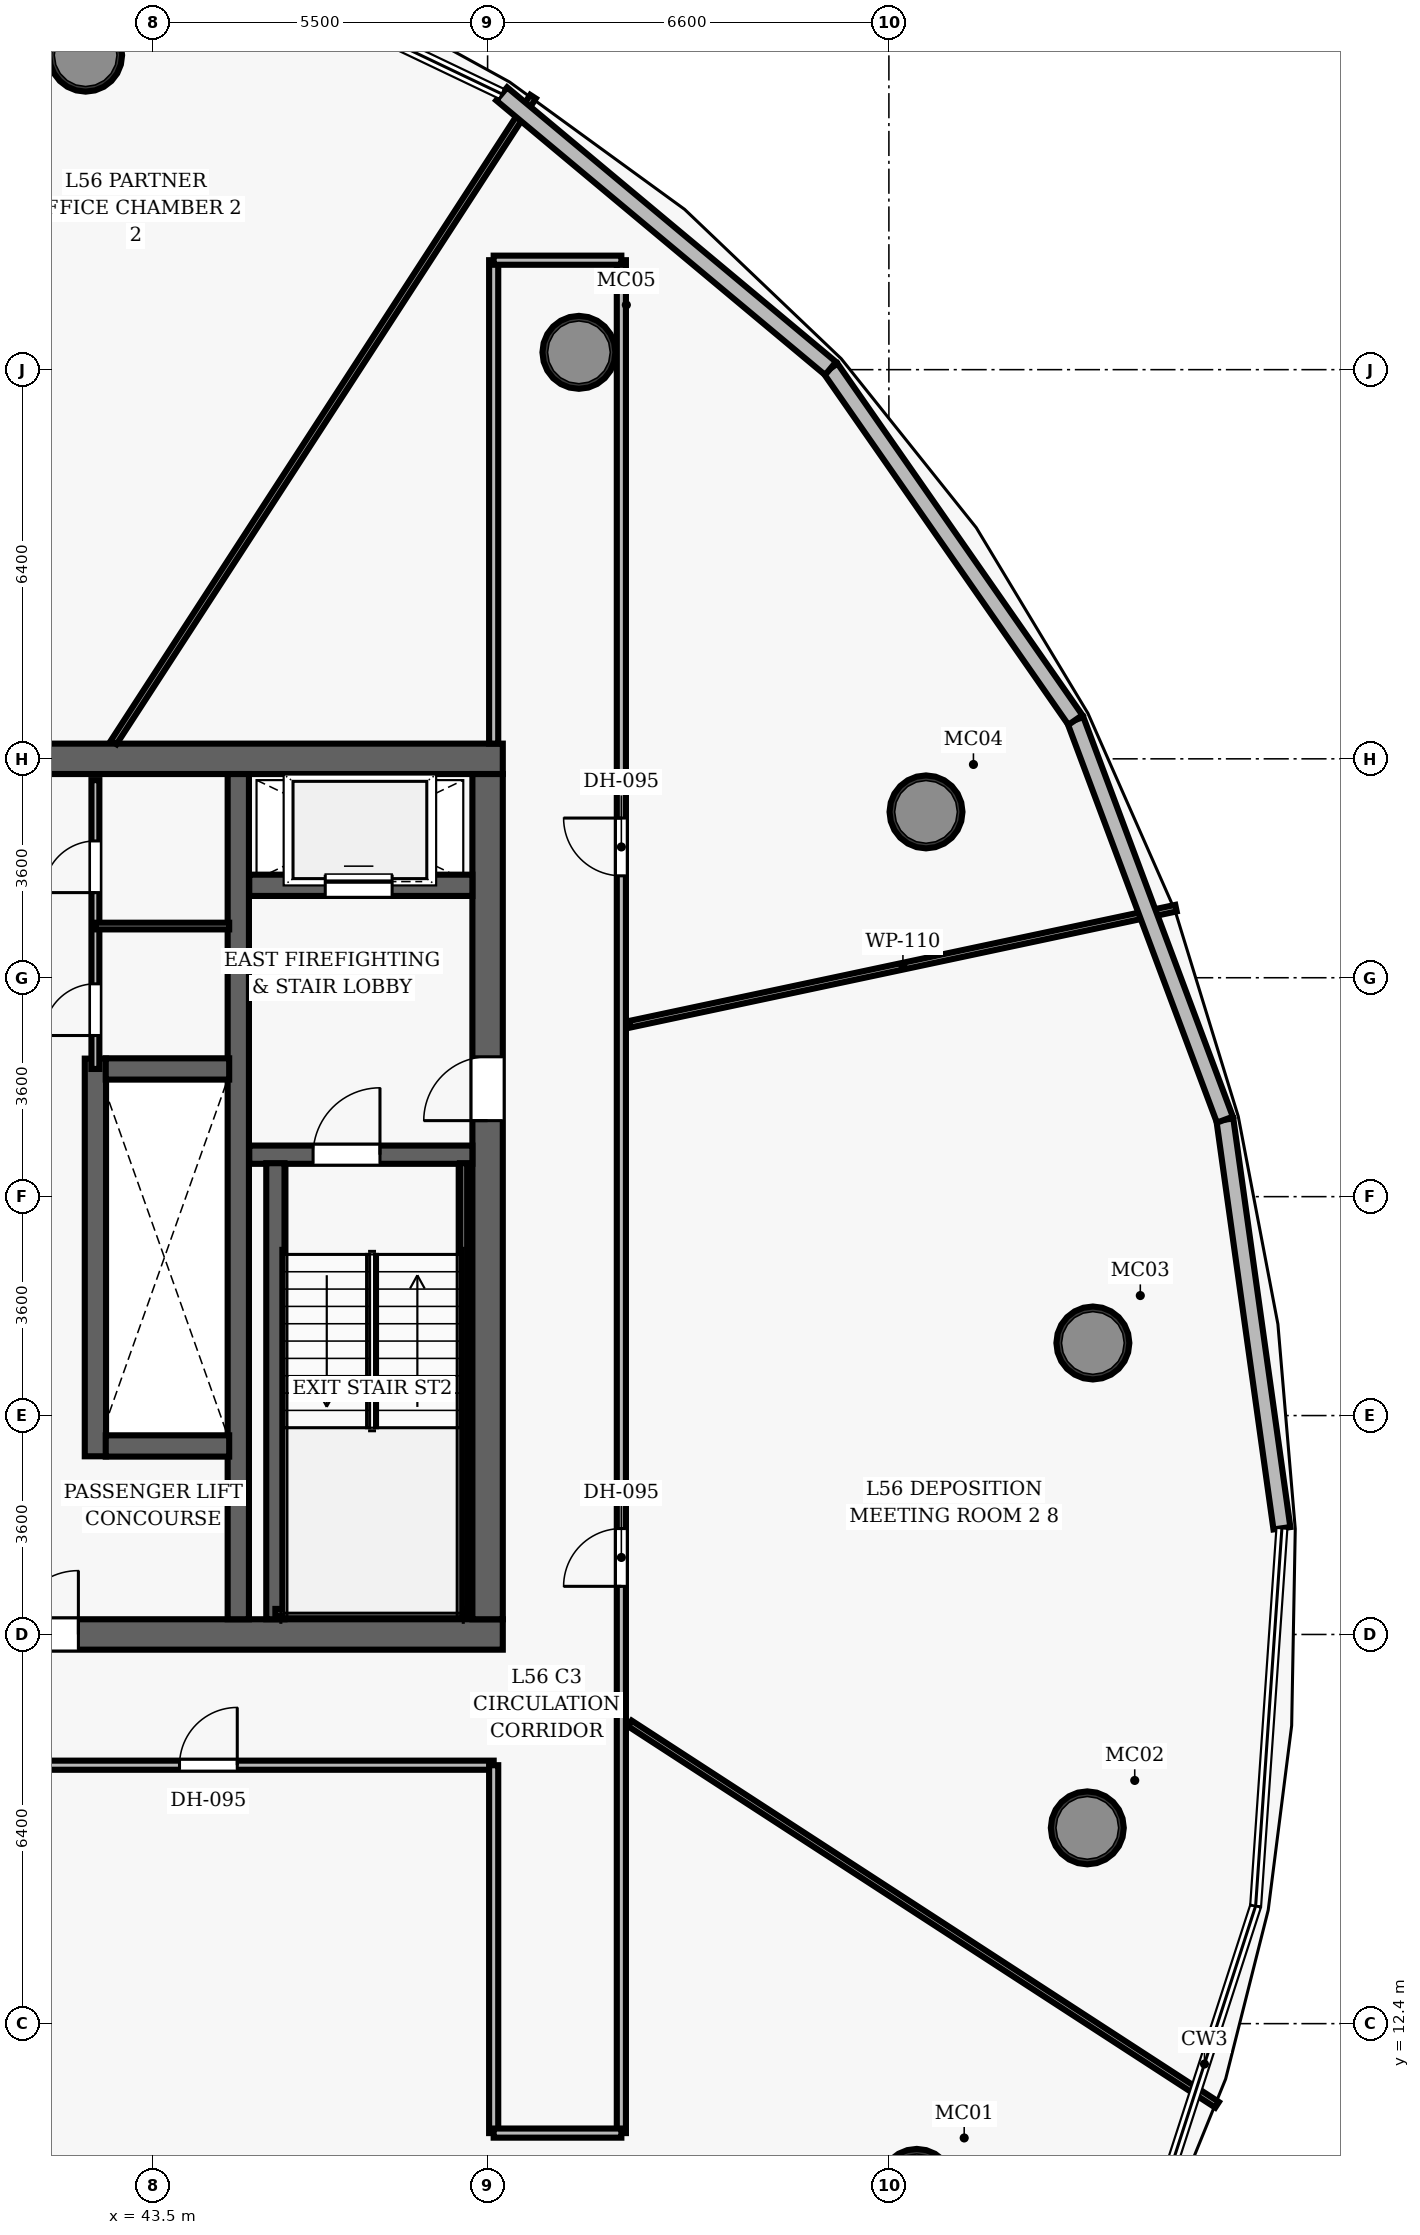
"""IFC4 building model, lengths in metres.
Left out: names, types, materials, properties, quantities, classifications, styles, units other than length and angle.
Written with IfcOpenShell. Run it as: python <this file> out.ifc"""

import sys

from ifc_helpers import new_model, si_unit, direction, frame, frame_2d, origin, origin_2d, place, context, subcontext, project, spatial, rectangle, hollow_circle, extrude, element, fill, save


model = new_model("IFC4")
c1 = context("Model", 3, precision=1e-05, world=origin(), true_north=direction((0.0, 1.0)))
c2 = subcontext(c1, "Body", "Model", "MODEL_VIEW")
j1 = project(units=[si_unit("LENGTHUNIT", "METRE"), si_unit("PLANEANGLEUNIT", "RADIAN")], contexts=[c1])
p1 = place(None, origin())
s1 = spatial("IfcSite", under=j1, at=p1, CompositionType="ELEMENT")
p2 = place(p1, origin())
s2 = spatial("IfcBuilding", under=s1, at=p2, CompositionType="ELEMENT")
p3 = place(p2, frame((0.0, 0.0, 221.25)))
s3 = spatial("IfcBuildingStorey", under=s2, at=p3, CompositionType="ELEMENT", Elevation=221.25)
p4 = place(p3, frame((26.75, 18.8, 0.0), z_axis=(0.0, 0.0, 1.0), x_axis=(1.0, 0.0, 0.0)))
e1 = element("IfcWall", 1, at=p4, inside=s3, PredefinedType="SHEAR", context=c2, shape_type="SweptSolid", body=[
    extrude(rectangle(XDim=22.5, YDim=0.5, at=frame_2d((11.25, 0.0))), origin(), (0.0, 0.0, 1.0), 3.85),
])
p5 = place(p4, frame((14.47, 0.0, 0.0)))
e2 = element("IfcOpeningElement", 2, at=p5, cuts=e1, PredefinedType="OPENING", context=c2, shape_type="SweptSolid", body=[
    extrude(rectangle(XDim=1.05, YDim=2.15, at=frame_2d((0.525, 1.075))), frame((0.0, 0.26, 0.0), z_axis=(0.0, -1.0, 0.0), x_axis=(1.0, 0.0, 0.0)), (0.0, 0.0, 1.0), 0.52),
])
p6 = place(p3, frame((26.75, 33.2, 0.0), z_axis=(0.0, 0.0, 1.0), x_axis=(1.0, 0.0, 0.0)))
e3 = element("IfcWall", 3, at=p6, inside=s3, PredefinedType="SHEAR", context=c2, shape_type="SweptSolid", body=[
    extrude(rectangle(XDim=22.5, YDim=0.5, at=frame_2d((11.25, 0.0))), origin(), (0.0, 0.0, 1.0), 3.85),
])
p7 = place(p3, frame((49.0, 19.05, 0.0), z_axis=(0.0, 0.0, 1.0), x_axis=(0.0, 1.0, 0.0)))
e4 = element("IfcWall", 4, at=p7, inside=s3, PredefinedType="SHEAR", context=c2, shape_type="SweptSolid", body=[
    extrude(rectangle(XDim=13.9, YDim=0.5, at=frame_2d((6.95, 0.0))), origin(), (0.0, 0.0, 1.0), 3.85),
])
p8 = place(p7, frame((8.2, 0.0, 0.0)))
e5 = element("IfcOpeningElement", 5, at=p8, cuts=e4, PredefinedType="OPENING", context=c2, shape_type="SweptSolid", body=[
    extrude(rectangle(XDim=1.05, YDim=2.15, at=frame_2d((0.525, 1.075))), frame((0.0, 0.26, 0.0), z_axis=(0.0, -1.0, 0.0), x_axis=(1.0, 0.0, 0.0)), (0.0, 0.0, 1.0), 0.52),
])
p9 = place(p3, frame((44.9, 19.05, 0.0), z_axis=(0.0, 0.0, 1.0), x_axis=(0.0, 1.0, 0.0)))
e6 = element("IfcWall", 6, at=p9, inside=s3, PredefinedType="SHEAR", context=c2, shape_type="SweptSolid", body=[
    extrude(rectangle(XDim=13.9, YDim=0.35, at=frame_2d((6.95, 0.0))), origin(), (0.0, 0.0, 1.0), 3.85),
])
for number, where, z_axis, x_axis in (
    (7, (56.058, 9.74, 0.0), (0.0, 0.0, 1.0), (1.0, 0.0, 0.0)),
    (8, (58.863, 15.619, 0.0), (0.0, 0.0, 1.0), (1.0, 0.0, 0.0)),
    (9, (58.955, 23.594, 0.0), (0.0, 0.0, 1.0), (1.0, 0.0, 0.0)),
    (10, (56.21, 32.327, 0.0), (0.0, 0.0, 1.0), (1.0, 0.0, 0.0)),
    (11, (50.502, 39.885, 0.0), (0.0, 0.0, 1.0), (1.0, 0.0, 0.0)),
    (12, (42.389, 44.772, 0.0), (0.0, 0.0, 1.0), (1.0, 0.0, 0.0)),
):
    element("IfcColumn", number, at=place(p3, frame(where, z_axis=z_axis, x_axis=x_axis)), inside=s3, PredefinedType="COLUMN", context=c2, shape_type="SweptSolid", body=[
        extrude(hollow_circle(Radius=0.6, WallThickness=0.05, at=origin_2d()), origin(), (0.0, 0.0, 1.0), 3.85),
    ])
p10 = place(p3, frame((45.08, 26.69, 0.0), z_axis=(0.0, 0.0, 1.0), x_axis=(1.0, 0.0, 0.0)))
e13 = element("IfcWall", 13, at=p10, inside=s3, PredefinedType="SHEAR", context=c2, shape_type="SweptSolid", body=[
    extrude(rectangle(XDim=3.67, YDim=0.3, at=frame_2d((1.835, 0.0))), origin(), (0.0, 0.0, 1.0), 3.85),
])
p11 = place(p10, frame((1.05, 0.0, 0.0)))
e14 = element("IfcOpeningElement", 14, at=p11, cuts=e13, PredefinedType="OPENING", context=c2, shape_type="SweptSolid", body=[
    extrude(rectangle(XDim=1.1, YDim=2.15, at=frame_2d((0.55, 1.075))), frame((0.0, 0.16, 0.0), z_axis=(0.0, -1.0, 0.0), x_axis=(1.0, 0.0, 0.0)), (0.0, 0.0, 1.0), 0.32),
])
p12 = place(p3, frame((45.51, 19.05, 0.0), z_axis=(0.0, 0.0, 1.0), x_axis=(0.0, 1.0, 0.0)))
e15 = element("IfcWall", 15, at=p12, inside=s3, PredefinedType="SHEAR", context=c2, shape_type="SweptSolid", body=[
    extrude(rectangle(XDim=7.5, YDim=0.3, at=frame_2d((3.75, 0.0))), origin(), (0.0, 0.0, 1.0), 3.85),
])
p13 = place(p3, frame((48.605, 19.1, 0.0), z_axis=(0.0, 0.0, 1.0), x_axis=(0.0, 1.0, 0.0)))
e16 = element("IfcWall", 16, at=p13, inside=s3, PredefinedType="SHEAR", context=c2, shape_type="SweptSolid", body=[
    extrude(rectangle(XDim=7.45, YDim=0.12, at=frame_2d((3.725, 0.0))), origin(), (0.0, 0.0, 1.0), 3.85),
])
p14 = place(p3, frame((45.51, 19.16, 0.0), z_axis=(0.0, 0.0, 1.0), x_axis=(1.0, 0.0, 0.0)))
e17 = element("IfcWall", 17, at=p14, inside=s3, PredefinedType="SHEAR", context=c2, shape_type="SweptSolid", body=[
    extrude(rectangle(XDim=3.095, YDim=0.12, at=frame_2d((1.547, 0.0))), origin(), (0.0, 0.0, 1.0), 3.85),
])
p15 = place(p3, frame((45.08, 31.12, 0.0), z_axis=(0.0, 0.0, 1.0), x_axis=(1.0, 0.0, 0.0)))
e18 = element("IfcWall", 18, at=p15, inside=s3, PredefinedType="SHEAR", context=c2, shape_type="SweptSolid", body=[
    extrude(rectangle(XDim=3.67, YDim=0.35, at=frame_2d((1.835, 0.0))), origin(), (0.0, 0.0, 1.0), 3.035),
])
p16 = place(p15, frame((1.25, 0.0, 0.0)))
e19 = element("IfcOpeningElement", 19, at=p16, cuts=e18, PredefinedType="OPENING", context=c2, shape_type="SweptSolid", body=[
    extrude(rectangle(XDim=1.1, YDim=2.15, at=frame_2d((0.55, 1.075))), frame((0.0, 0.185, 0.0), z_axis=(0.0, -1.0, 0.0), x_axis=(1.0, 0.0, 0.0)), (0.0, 0.0, 1.0), 0.37),
])
p17 = place(p3, frame((42.55, 21.73, 0.0), z_axis=(0.0, 0.0, 1.0), x_axis=(0.0, 1.0, 0.0)))
e20 = element("IfcWall", 20, at=p17, inside=s3, PredefinedType="SHEAR", context=c2, shape_type="SweptSolid", body=[
    extrude(rectangle(XDim=6.54, YDim=0.35, at=frame_2d((3.27, 0.0))), origin(), (0.0, 0.0, 1.0), 3.035),
])
for number, where, z_axis, x_axis in (
    (21, (42.72, 21.9, 0.0), (0.0, 0.0, 1.0), (1.0, 0.0, 0.0)),
    (22, (42.72, 28.1, 0.0), (0.0, 0.0, 1.0), (1.0, 0.0, 0.0)),
):
    element("IfcWall", number, at=place(p3, frame(where, z_axis=z_axis, x_axis=x_axis)), inside=s3, PredefinedType="SHEAR", context=c2, shape_type="SweptSolid", body=[
        extrude(rectangle(XDim=2.03, YDim=0.35, at=frame_2d((1.015, 0.0))), origin(), (0.0, 0.0, 1.0), 3.035),
    ])
p18 = place(p3, frame((42.55, 28.1, 0.0), z_axis=(0.0, 0.0, 1.0), x_axis=(0.0, 1.0, 0.0)))
e23 = element("IfcWall", 23, at=p18, inside=s3, PredefinedType="PARTITIONING", context=c2, shape_type="SweptSolid", body=[
    extrude(rectangle(XDim=4.75, YDim=0.13, at=frame_2d((2.375, 0.0))), origin(), (0.0, 0.0, 1.0), 3.035),
])
p19 = place(p18, frame((0.55, 0.0, 0.0)))
e24 = element("IfcOpeningElement", 24, at=p19, cuts=e23, PredefinedType="OPENING", context=c2, shape_type="SweptSolid", body=[
    extrude(rectangle(XDim=0.85, YDim=2.1, at=frame_2d((0.425, 1.05))), frame((0.0, 0.075, 0.0), z_axis=(0.0, -1.0, 0.0), x_axis=(1.0, 0.0, 0.0)), (0.0, 0.0, 1.0), 0.15),
])
p20 = place(p18, frame((2.9, 0.0, 0.0)))
e25 = element("IfcOpeningElement", 25, at=p20, cuts=e23, PredefinedType="OPENING", context=c2, shape_type="SweptSolid", body=[
    extrude(rectangle(XDim=0.85, YDim=2.1, at=frame_2d((0.425, 1.05))), frame((0.0, 0.075, 0.0), z_axis=(0.0, -1.0, 0.0), x_axis=(1.0, 0.0, 0.0)), (0.0, 0.0, 1.0), 0.15),
])
p21 = place(p3, frame((42.55, 30.45, 0.0), z_axis=(0.0, 0.0, 1.0), x_axis=(1.0, 0.0, 0.0)))
e26 = element("IfcWall", 26, at=p21, inside=s3, PredefinedType="PARTITIONING", context=c2, shape_type="SweptSolid", body=[
    extrude(rectangle(XDim=2.2, YDim=0.11, at=frame_2d((1.1, 0.0))), origin(), (0.0, 0.0, 1.0), 3.035),
])
p22 = place(p3, frame((26.9, 16.65, 0.0), z_axis=(0.0, 0.0, 1.0), x_axis=(1.0, 0.0, 0.0)))
e27 = element("IfcWall", 27, at=p22, inside=s3, PredefinedType="PARTITIONING", context=c2, shape_type="SweptSolid", body=[
    extrude(rectangle(XDim=22.2, YDim=0.15, at=frame_2d((11.1, 0.0))), origin(), (0.0, 0.0, 1.0), 3.035),
])
p23 = place(p22, frame((10.744, 0.0, 0.0)))
e28 = element("IfcOpeningElement", 28, at=p23, cuts=e27, PredefinedType="OPENING", context=c2, shape_type="SweptSolid", body=[
    extrude(rectangle(XDim=0.95, YDim=2.15, at=frame_2d((0.475, 1.075))), frame((0.0, 0.085, 0.0), z_axis=(0.0, -1.0, 0.0), x_axis=(1.0, 0.0, 0.0)), (0.0, 0.0, 1.0), 0.17),
])
p24 = place(p22, frame((17.033, 0.0, 0.0)))
e29 = element("IfcOpeningElement", 29, at=p24, cuts=e27, PredefinedType="OPENING", context=c2, shape_type="SweptSolid", body=[
    extrude(rectangle(XDim=0.95, YDim=2.15, at=frame_2d((0.475, 1.075))), frame((0.0, 0.085, 0.0), z_axis=(0.0, -1.0, 0.0), x_axis=(1.0, 0.0, 0.0)), (0.0, 0.0, 1.0), 0.17),
])
p25 = place(p3, frame((51.2, 10.6, 0.0), z_axis=(0.0, 0.0, 1.0), x_axis=(0.0, 1.0, 0.0)))
e30 = element("IfcWall", 30, at=p25, inside=s3, PredefinedType="PARTITIONING", context=c2, shape_type="SweptSolid", body=[
    extrude(rectangle(XDim=30.8, YDim=0.15, at=frame_2d((15.4, 0.0))), origin(), (0.0, 0.0, 1.0), 3.035),
])
p26 = place(p25, frame((20.676, 0.0, 0.0)))
e31 = element("IfcOpeningElement", 31, at=p26, cuts=e30, PredefinedType="OPENING", context=c2, shape_type="SweptSolid", body=[
    extrude(rectangle(XDim=0.95, YDim=2.15, at=frame_2d((0.475, 1.075))), frame((0.0, 0.085, 0.0), z_axis=(0.0, -1.0, 0.0), x_axis=(1.0, 0.0, 0.0)), (0.0, 0.0, 1.0), 0.17),
])
p27 = place(p25, frame((8.992, 0.0, 0.0)))
e32 = element("IfcOpeningElement", 32, at=p27, cuts=e30, PredefinedType="OPENING", context=c2, shape_type="SweptSolid", body=[
    extrude(rectangle(XDim=0.95, YDim=2.15, at=frame_2d((0.475, 1.075))), frame((0.0, 0.085, 0.0), z_axis=(0.0, -1.0, 0.0), x_axis=(1.0, 0.0, 0.0)), (0.0, 0.0, 1.0), 0.17),
])
p28 = place(p3, frame((49.1, 10.6, 0.0), z_axis=(0.0, 0.0, 1.0), x_axis=(0.0, 1.0, 0.0)))
e33 = element("IfcWall", 33, at=p28, inside=s3, PredefinedType="PARTITIONING", context=c2, shape_type="SweptSolid", body=[
    extrude(rectangle(XDim=6.05, YDim=0.15, at=frame_2d((3.025, 0.0))), origin(), (0.0, 0.0, 1.0), 3.035),
])
p29 = place(p3, frame((49.1, 33.45, 0.0), z_axis=(0.0, 0.0, 1.0), x_axis=(0.0, 1.0, 0.0)))
e34 = element("IfcWall", 34, at=p29, inside=s3, PredefinedType="PARTITIONING", context=c2, shape_type="SweptSolid", body=[
    extrude(rectangle(XDim=7.95, YDim=0.15, at=frame_2d((3.975, 0.0))), origin(), (0.0, 0.0, 1.0), 3.035),
])
for number, where, z_axis, x_axis in (
    (35, (49.1, 10.6, 0.0), (0.0, 0.0, 1.0), (1.0, 0.0, 0.0)),
    (36, (49.1, 41.4, 0.0), (0.0, 0.0, 1.0), (1.0, 0.0, 0.0)),
):
    element("IfcWall", number, at=place(p3, frame(where, z_axis=z_axis, x_axis=x_axis)), inside=s3, PredefinedType="PARTITIONING", context=c2, shape_type="SweptSolid", body=[
        extrude(rectangle(XDim=2.1, YDim=0.15, at=frame_2d((1.05, 0.0))), origin(), (0.0, 0.0, 1.0), 3.035),
    ])
p30 = place(p3, frame((51.34, 28.835, 0.0), z_axis=(0.0, 0.0, 1.0), x_axis=(0.97814621295, 0.20791821972, 0.0)))
e37 = element("IfcWall", 37, at=p30, inside=s3, PredefinedType="PARTITIONING", context=c2, shape_type="SweptSolid", body=[
    extrude(rectangle(XDim=9.182, YDim=0.11, at=frame_2d((4.591, 0.0))), origin(), (0.0, 0.0, 1.0), 3.035),
])
p31 = place(p3, frame((42.851, 33.47, 0.0), z_axis=(0.0, 0.0, 1.0), x_axis=(0.544635209489, 0.838673052259, 0.0)))
e38 = element("IfcWall", 38, at=p31, inside=s3, PredefinedType="PARTITIONING", context=c2, shape_type="SweptSolid", body=[
    extrude(rectangle(XDim=12.662, YDim=0.11, at=frame_2d((6.331, 0.0))), origin(), (0.0, 0.0, 1.0), 3.035),
])
p32 = place(p3, frame((40.017, 16.51, 0.0), z_axis=(0.0, 0.0, 1.0), x_axis=(0.207914047214, -0.978147099863, 0.0)))
e39 = element("IfcWall", 39, at=p32, inside=s3, PredefinedType="PARTITIONING", context=c2, shape_type="SweptSolid", body=[
    extrude(rectangle(XDim=15.684, YDim=0.11, at=frame_2d((7.842, 0.0))), origin(), (0.0, 0.0, 1.0), 3.035),
])
p33 = place(p3, frame((51.34, 17.337, 0.0), z_axis=(0.0, 0.0, 1.0), x_axis=(0.838670245997, -0.544639530771, 0.0)))
e40 = element("IfcWall", 40, at=p33, inside=s3, PredefinedType="PARTITIONING", context=c2, shape_type="SweptSolid", body=[
    extrude(rectangle(XDim=11.515, YDim=0.11, at=frame_2d((5.757, 0.0))), origin(), (0.0, 0.0, 1.0), 3.035),
])
p34 = place(p3, frame((61.125, 27.266, 0.0), z_axis=(0.0, 0.0, 1.0), x_axis=(0.138287146669, -0.990392177406, 0.0)))
e41 = element("IfcWall", 41, at=p34, inside=s3, PredefinedType="SOLIDWALL", context=c2, shape_type="SweptSolid", body=[
    extrude(rectangle(XDim=6.785, YDim=0.28, at=frame_2d((3.392, 0.0))), origin(), (0.0, 0.0, 1.0), 3.62),
])
p35 = place(p3, frame((58.667, 33.839, 0.0), z_axis=(0.0, 0.0, 1.0), x_axis=(0.350368435695, -0.93661195768, 0.0)))
e42 = element("IfcWall", 42, at=p35, inside=s3, PredefinedType="SOLIDWALL", context=c2, shape_type="SweptSolid", body=[
    extrude(rectangle(XDim=7.018, YDim=0.28, at=frame_2d((3.509, 0.0))), origin(), (0.0, 0.0, 1.0), 3.62),
])
p36 = place(p3, frame((54.64, 39.621, 0.0), z_axis=(0.0, 0.0, 1.0), x_axis=(0.571474586203, -0.820619764156, 0.0)))
e43 = element("IfcWall", 43, at=p36, inside=s3, PredefinedType="SOLIDWALL", context=c2, shape_type="SweptSolid", body=[
    extrude(rectangle(XDim=7.046, YDim=0.28, at=frame_2d((3.523, 0.0))), origin(), (0.0, 0.0, 1.0), 3.62),
])
p37 = place(p3, frame((49.232, 44.135, 0.0), z_axis=(0.0, 0.0, 1.0), x_axis=(0.767687026112, -0.640824960453, 0.0)))
e44 = element("IfcWall", 44, at=p37, inside=s3, PredefinedType="SOLIDWALL", context=c2, shape_type="SweptSolid", body=[
    extrude(rectangle(XDim=7.045, YDim=0.28, at=frame_2d((3.523, 0.0))), origin(), (0.0, 0.0, 1.0), 3.62),
])
p38 = place(p11, origin())
e45 = element("IfcDoor", 45, at=p38, inside=s3, OperationType="SINGLE_SWING_RIGHT", PredefinedType="DOOR", context=c2, shape_type="SweptSolid", body=[
    extrude(rectangle(XDim=1.1, YDim=2.15, at=frame_2d((0.55, 1.075))), frame((0.0, 0.025, 0.0), z_axis=(0.0, -1.0, 0.0), x_axis=(1.0, 0.0, 0.0)), (0.0, 0.0, 1.0), 0.05),
])
fill(e14, e45)
p39 = place(p8, origin())
e46 = element("IfcDoor", 46, at=p39, inside=s3, OperationType="SINGLE_SWING_LEFT", PredefinedType="DOOR", context=c2, shape_type="SweptSolid", body=[
    extrude(rectangle(XDim=1.05, YDim=2.15, at=frame_2d((0.525, 1.075))), frame((0.0, 0.025, 0.0), z_axis=(0.0, -1.0, 0.0), x_axis=(1.0, 0.0, 0.0)), (0.0, 0.0, 1.0), 0.05),
])
fill(e5, e46)
p40 = place(p5, origin())
e47 = element("IfcDoor", 47, at=p40, inside=s3, OperationType="SINGLE_SWING_RIGHT", PredefinedType="DOOR", context=c2, shape_type="SweptSolid", body=[
    extrude(rectangle(XDim=1.05, YDim=2.15, at=frame_2d((0.525, 1.075))), frame((0.0, 0.025, 0.0), z_axis=(0.0, -1.0, 0.0), x_axis=(1.0, 0.0, 0.0)), (0.0, 0.0, 1.0), 0.05),
])
fill(e2, e47)
p41 = place(p19, origin())
e48 = element("IfcDoor", 48, at=p41, inside=s3, OperationType="SINGLE_SWING_LEFT", PredefinedType="DOOR", context=c2, shape_type="SweptSolid", body=[
    extrude(rectangle(XDim=0.85, YDim=2.1, at=frame_2d((0.425, 1.05))), frame((0.0, 0.025, 0.0), z_axis=(0.0, -1.0, 0.0), x_axis=(1.0, 0.0, 0.0)), (0.0, 0.0, 1.0), 0.05),
])
fill(e24, e48)
p42 = place(p20, origin())
e49 = element("IfcDoor", 49, at=p42, inside=s3, OperationType="SINGLE_SWING_LEFT", PredefinedType="DOOR", context=c2, shape_type="SweptSolid", body=[
    extrude(rectangle(XDim=0.85, YDim=2.1, at=frame_2d((0.425, 1.05))), frame((0.0, 0.025, 0.0), z_axis=(0.0, -1.0, 0.0), x_axis=(1.0, 0.0, 0.0)), (0.0, 0.0, 1.0), 0.05),
])
fill(e25, e49)
p43 = place(p26, origin())
e50 = element("IfcDoor", 50, at=p43, inside=s3, OperationType="SINGLE_SWING_RIGHT", PredefinedType="DOOR", context=c2, shape_type="SweptSolid", body=[
    extrude(rectangle(XDim=0.95, YDim=2.15, at=frame_2d((0.475, 1.075))), frame((0.0, 0.025, 0.0), z_axis=(0.0, -1.0, 0.0), x_axis=(1.0, 0.0, 0.0)), (0.0, 0.0, 1.0), 0.05),
])
fill(e31, e50)
p44 = place(p24, origin())
e51 = element("IfcDoor", 51, at=p44, inside=s3, OperationType="SINGLE_SWING_RIGHT", PredefinedType="DOOR", context=c2, shape_type="SweptSolid", body=[
    extrude(rectangle(XDim=0.95, YDim=2.15, at=frame_2d((0.475, 1.075))), frame((0.0, 0.025, 0.0), z_axis=(0.0, -1.0, 0.0), x_axis=(1.0, 0.0, 0.0)), (0.0, 0.0, 1.0), 0.05),
])
fill(e29, e51)
p45 = place(p27, origin())
e52 = element("IfcDoor", 52, at=p45, inside=s3, OperationType="SINGLE_SWING_LEFT", PredefinedType="DOOR", context=c2, shape_type="SweptSolid", body=[
    extrude(rectangle(XDim=0.95, YDim=2.15, at=frame_2d((0.475, 1.075))), frame((0.0, 0.025, 0.0), z_axis=(0.0, -1.0, 0.0), x_axis=(1.0, 0.0, 0.0)), (0.0, 0.0, 1.0), 0.05),
])
fill(e32, e52)
p46 = place(p16, origin())
e53 = element("IfcDoor", 53, at=p46, inside=s3, OperationType="SLIDING_TO_LEFT", PredefinedType="DOOR", context=c2, shape_type="SweptSolid", body=[
    extrude(rectangle(XDim=1.1, YDim=2.15, at=frame_2d((0.55, 1.075))), frame((0.0, 0.025, 0.0), z_axis=(0.0, -1.0, 0.0), x_axis=(1.0, 0.0, 0.0)), (0.0, 0.0, 1.0), 0.05),
])
fill(e19, e53)
save(model, sys.argv[1])
